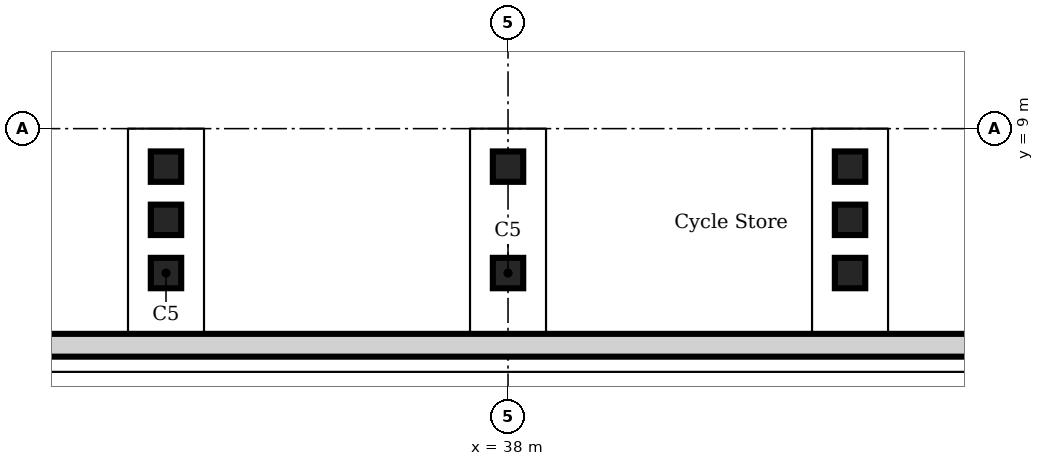
"""IFC4 building model, lengths in metres.
Left out: names, types, materials, properties, quantities, classifications, styles, units other than length and angle.
Written with IfcOpenShell. Run it as: python <this file> out.ifc"""

import sys

from ifc_helpers import new_model, si_unit, direction, frame, frame_2d, origin, origin_2d, place, context, subcontext, project, spatial, rectangle, hollow_circle, extrude, element, save


model = new_model("IFC4")
c1 = context("Model", 3, precision=1e-05, world=origin(), true_north=direction((0.0, 1.0)))
c2 = subcontext(c1, "Body", "Model", "MODEL_VIEW")
j1 = project(units=[si_unit("LENGTHUNIT", "METRE"), si_unit("PLANEANGLEUNIT", "RADIAN")], contexts=[c1])
p1 = place(None, origin())
s1 = spatial("IfcSite", under=j1, at=p1, CompositionType="ELEMENT")
p2 = place(p1, origin())
s2 = spatial("IfcBuilding", under=s1, at=p2, CompositionType="ELEMENT")
p3 = place(p2, origin())
s3 = spatial("IfcBuildingStorey", under=s2, at=p3, CompositionType="ELEMENT", Elevation=0.0)
for number, where, z_axis, x_axis in (
    (1, (33.5, 7.1, 0.0), (0.0, 0.0, 1.0), (1.0, 0.0, 0.0)),
    (2, (38.0, 7.1, 0.0), (0.0, 0.0, 1.0), (1.0, 0.0, 0.0)),
    (3, (42.5, 7.1, 0.0), (0.0, 0.0, 1.0), (1.0, 0.0, 0.0)),
    (4, (33.5, 8.5, 0.0), (0.0, 0.0, 1.0), (1.0, 0.0, 0.0)),
    (5, (38.0, 8.5, 0.0), (0.0, 0.0, 1.0), (1.0, 0.0, 0.0)),
    (6, (42.5, 8.5, 0.0), (0.0, 0.0, 1.0), (1.0, 0.0, 0.0)),
):
    element("IfcColumn", number, at=place(p3, frame(where, z_axis=z_axis, x_axis=x_axis)), inside=s3, PredefinedType="COLUMN", context=c2, shape_type="SweptSolid", body=[
        extrude(hollow_circle(Radius=0.084, WallThickness=0.008, at=origin_2d()), origin(), (0.0, 0.0, 1.0), 2.4),
    ])
for number, where, z_axis, x_axis in (
    (7, (33.5, 7.8, 0.0), (0.0, 0.0, 1.0), (1.0, 0.0, 0.0)),
    (8, (42.5, 7.8, 0.0), (0.0, 0.0, 1.0), (1.0, 0.0, 0.0)),
):
    element("IfcColumn", number, at=place(p3, frame(where, z_axis=z_axis, x_axis=x_axis)), inside=s3, PredefinedType="COLUMN", context=c2, shape_type="SweptSolid", body=[
        extrude(hollow_circle(Radius=0.084, WallThickness=0.008, at=origin_2d()), origin(), (0.0, 0.0, 1.0), 2.45),
    ])
p4 = place(p3, frame((5.8, 6.15, -0.5), z_axis=(0.0, 0.0, 1.0), x_axis=(1.0, 0.0, 0.0)))
e9 = element("IfcWall", 9, at=p4, inside=s3, PredefinedType="SOLIDWALL", context=c2, shape_type="SweptSolid", body=[
    extrude(rectangle(XDim=77.7, YDim=0.3, at=frame_2d((38.85, 0.0))), origin(), (0.0, 0.0, 1.0), 1.7),
])
save(model, sys.argv[1])
